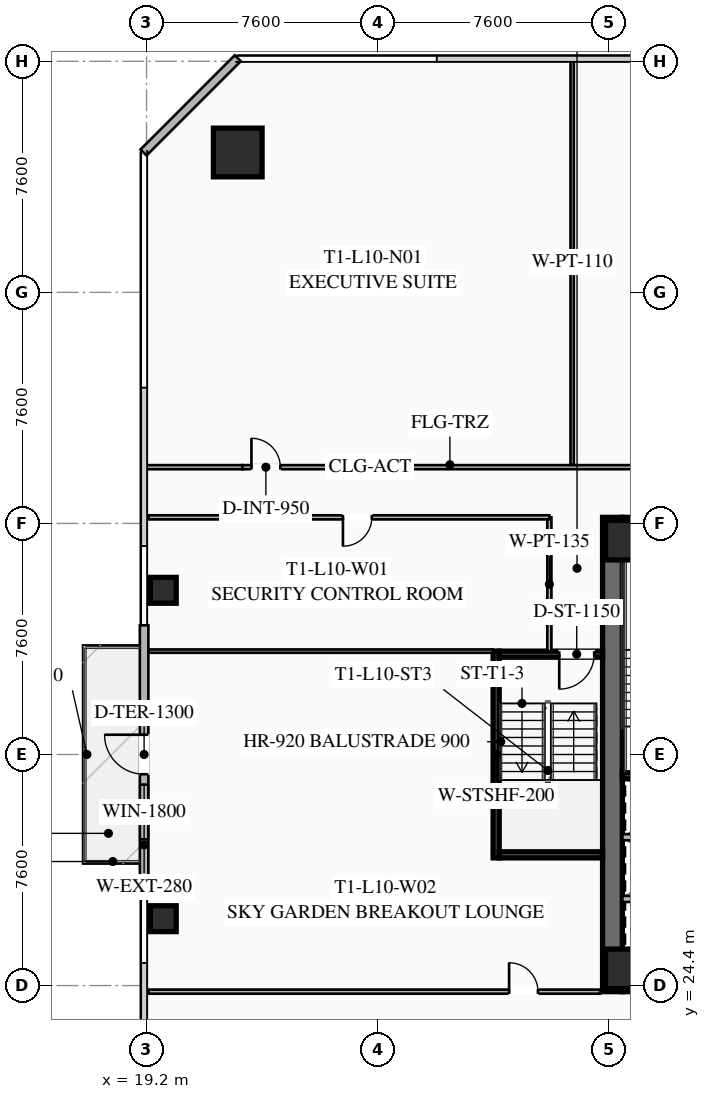
"""IFC4 building model, lengths in metres.
Left out: names, types, materials, properties, quantities, classifications, styles, units other than length and angle.
Written with IfcOpenShell. Run it as: python <this file> out.ifc"""

import sys

from ifc_helpers import new_model, si_unit, direction, frame, frame_2d, origin, origin_2d, place, context, subcontext, project, spatial, rectangle, hollow_rectangle, extrude, element, fill, save


model = new_model("IFC4")
c1 = context("Model", 3, precision=1e-05, world=origin(), true_north=direction((0.0, 1.0)))
c2 = subcontext(c1, "Body", "Model", "MODEL_VIEW")
j1 = project(units=[si_unit("LENGTHUNIT", "METRE"), si_unit("PLANEANGLEUNIT", "RADIAN")], contexts=[c1])
p1 = place(None, origin())
s1 = spatial("IfcSite", under=j1, at=p1, CompositionType="ELEMENT")
p2 = place(p1, origin())
s2 = spatial("IfcBuilding", under=s1, at=p2, CompositionType="ELEMENT")
p3 = place(p2, frame((0.0, 0.0, 42.35)))
s3 = spatial("IfcBuildingStorey", under=s2, at=p3, CompositionType="ELEMENT", Elevation=42.35)
p4 = place(p3, frame((34.525, 24.2, 0.0), z_axis=(0.0, 0.0, 1.0), x_axis=(0.0, 1.0, 0.0)))
e1 = element("IfcWall", 1, at=p4, inside=s3, PredefinedType="SHEAR", context=c2, shape_type="SweptSolid", body=[
    extrude(rectangle(XDim=15.6, YDim=0.65, at=frame_2d((7.8, 0.0))), origin(), (0.0, 0.0, 1.0), 3.55),
])
p5 = place(p3, frame((49.15, 24.525, 0.0), z_axis=(0.0, 0.0, 1.0), x_axis=(-1.0, 0.0, 0.0)))
e2 = element("IfcWall", 2, at=p5, inside=s3, PredefinedType="SHEAR", context=c2, shape_type="SweptSolid", body=[
    extrude(rectangle(XDim=14.3, YDim=0.65, at=frame_2d((7.15, 0.0))), origin(), (0.0, 0.0, 1.0), 3.55),
])
p6 = place(p5, frame((8.85, 0.0, 0.0)))
e3 = element("IfcOpeningElement", 3, at=p6, cuts=e2, PredefinedType="OPENING", context=c2, shape_type="SweptSolid", body=[
    extrude(rectangle(XDim=1.25, YDim=2.25, at=frame_2d((0.625, 1.125))), frame((0.0, 0.335, 0.0), z_axis=(0.0, -1.0, 0.0), x_axis=(1.0, 0.0, 0.0)), (0.0, 0.0, 1.0), 0.67),
])
p7 = place(p5, frame((3.8, 0.0, 0.0)))
e4 = element("IfcOpeningElement", 4, at=p7, cuts=e2, PredefinedType="OPENING", context=c2, shape_type="SweptSolid", body=[
    extrude(rectangle(XDim=1.25, YDim=2.25, at=frame_2d((0.625, 1.125))), frame((0.0, 0.335, 0.0), z_axis=(0.0, -1.0, 0.0), x_axis=(1.0, 0.0, 0.0)), (0.0, 0.0, 1.0), 0.67),
])
p8 = place(p3, frame((34.85, 39.475, 0.0), z_axis=(0.0, 0.0, 1.0), x_axis=(1.0, 0.0, 0.0)))
e5 = element("IfcWall", 5, at=p8, inside=s3, PredefinedType="SHEAR", context=c2, shape_type="SweptSolid", body=[
    extrude(rectangle(XDim=14.3, YDim=0.65, at=frame_2d((7.15, 0.0))), origin(), (0.0, 0.0, 1.0), 3.55),
])
p9 = place(p8, frame((4.2, 0.0, 0.0)))
e6 = element("IfcOpeningElement", 6, at=p9, cuts=e5, PredefinedType="OPENING", context=c2, shape_type="SweptSolid", body=[
    extrude(rectangle(XDim=1.25, YDim=2.25, at=frame_2d((0.625, 1.125))), frame((0.0, 0.335, 0.0), z_axis=(0.0, -1.0, 0.0), x_axis=(1.0, 0.0, 0.0)), (0.0, 0.0, 1.0), 0.67),
])
p10 = place(p8, frame((9.25, 0.0, 0.0)))
e7 = element("IfcOpeningElement", 7, at=p10, cuts=e5, PredefinedType="OPENING", context=c2, shape_type="SweptSolid", body=[
    extrude(rectangle(XDim=1.25, YDim=2.25, at=frame_2d((0.625, 1.125))), frame((0.0, 0.335, 0.0), z_axis=(0.0, -1.0, 0.0), x_axis=(1.0, 0.0, 0.0)), (0.0, 0.0, 1.0), 0.67),
])
for number, where, z_axis, x_axis in (
    (8, (34.95, 24.95, 0.0), (0.0, 0.0, 1.0), (1.0, 0.0, 0.0)),
    (9, (34.95, 39.05, 0.0), (0.0, 0.0, 1.0), (1.0, 0.0, 0.0)),
):
    element("IfcColumn", number, at=place(p3, frame(where, z_axis=z_axis, x_axis=x_axis)), inside=s3, PredefinedType="COLUMN", context=c2, shape_type="SweptSolid", body=[
        extrude(hollow_rectangle(XDim=1.3, YDim=1.3, WallThickness=0.05, at=origin_2d()), origin(), (0.0, 0.0, 1.0), 3.35),
    ])
p11 = place(p3, frame((22.2, 51.8, 0.0), z_axis=(0.0, 0.0, 1.0), x_axis=(1.0, 0.0, 0.0)))
e10 = element("IfcColumn", 10, at=p11, inside=s3, PredefinedType="COLUMN", context=c2, shape_type="SweptSolid", body=[
    extrude(hollow_rectangle(XDim=1.6, YDim=1.6, WallThickness=0.06, at=origin_2d()), origin(), (0.0, 0.0, 1.0), 3.35),
])
for number, where, z_axis, x_axis in (
    (11, (19.75, 37.4, 0.0), (0.0, 0.0, 1.0), (1.0, 0.0, 0.0)),
    (12, (19.75, 26.6, 0.0), (0.0, 0.0, 1.0), (1.0, 0.0, 0.0)),
):
    element("IfcColumn", number, at=place(p3, frame(where, z_axis=z_axis, x_axis=x_axis)), inside=s3, PredefinedType="COLUMN", context=c2, shape_type="SweptSolid", body=[
        extrude(hollow_rectangle(XDim=0.85, YDim=0.85, WallThickness=0.035, at=origin_2d()), origin(), (0.0, 0.0, 1.0), 3.35),
    ])
p12 = place(p3, frame((19.12, 27.75, 0.0), z_axis=(0.0, 0.0, 1.0), x_axis=(0.0, 1.0, 0.0)))
e13 = element("IfcWall", 13, at=p12, inside=s3, PredefinedType="SOLIDWALL", context=c2, shape_type="SweptSolid", body=[
    extrude(rectangle(XDim=8.5, YDim=0.28, at=frame_2d((4.25, 0.0))), origin(), (0.0, 0.0, 1.0), 3.35),
])
p13 = place(p12, frame((3.6, 0.0, 0.0)))
e14 = element("IfcOpeningElement", 14, at=p13, cuts=e13, PredefinedType="OPENING", context=c2, shape_type="SweptSolid", body=[
    extrude(rectangle(XDim=1.3, YDim=2.15, at=frame_2d((0.65, 1.075))), frame((0.0, 0.15, 0.0), z_axis=(0.0, -1.0, 0.0), x_axis=(1.0, 0.0, 0.0)), (0.0, 0.0, 1.0), 0.3),
])
p14 = place(p12, frame((1.46, 0.0, 0.85)))
e15 = element("IfcOpeningElement", 15, at=p14, cuts=e13, PredefinedType="OPENING", context=c2, shape_type="SweptSolid", body=[
    extrude(rectangle(XDim=1.8, YDim=1.92, at=frame_2d((0.9, 0.96))), frame((0.0, 0.15, 0.0), z_axis=(0.0, -1.0, 0.0), x_axis=(1.0, 0.0, 0.0)), (0.0, 0.0, 1.0), 0.3),
])
p15 = place(p3, frame((19.1, 51.8, 0.0), z_axis=(0.0, 0.0, 1.0), x_axis=(0.707106781187, 0.707106781187, 0.0)))
e16 = element("IfcWall", 16, at=p15, inside=s3, PredefinedType="SOLIDWALL", context=c2, shape_type="SweptSolid", body=[
    extrude(rectangle(XDim=4.384, YDim=0.28, at=frame_2d((2.192, 0.0))), origin(), (0.0, 0.0, 1.0), 3.35),
])
for number, where, z_axis, x_axis in (
    (17, (34.85, 31.3, 0.0), (0.0, 0.0, 1.0), (1.0, 0.0, 0.0)),
    (18, (34.85, 38.7, 0.0), (0.0, 0.0, 1.0), (1.0, 0.0, 0.0)),
):
    element("IfcWall", number, at=place(p3, frame(where, z_axis=z_axis, x_axis=x_axis)), inside=s3, PredefinedType="SHEAR", context=c2, shape_type="SweptSolid", body=[
        extrude(rectangle(XDim=3.45, YDim=0.2, at=frame_2d((1.725, 0.0))), origin(), (0.0, 0.0, 1.0), 3.35),
    ])
for number, where, z_axis, x_axis in (
    (19, (34.85, 27.25, 0.0), (0.0, 0.0, 1.0), (1.0, 0.0, 0.0)),
    (20, (34.85, 29.28, 0.0), (0.0, 0.0, 1.0), (1.0, 0.0, 0.0)),
):
    element("IfcWall", number, at=place(p3, frame(where, z_axis=z_axis, x_axis=x_axis)), inside=s3, PredefinedType="SOLIDWALL", context=c2, shape_type="SweptSolid", body=[
        extrude(rectangle(XDim=3.1, YDim=0.2, at=frame_2d((1.55, 0.0))), origin(), (0.0, 0.0, 1.0), 3.35),
    ])
p16 = place(p3, frame((30.7, 28.6, 0.0), z_axis=(0.0, 0.0, 1.0), x_axis=(0.0, 1.0, 0.0)))
e21 = element("IfcWall", 21, at=p16, inside=s3, PredefinedType="SHEAR", context=c2, shape_type="SweptSolid", body=[
    extrude(rectangle(XDim=6.8, YDim=0.2, at=frame_2d((3.4, 0.0))), origin(), (0.0, 0.0, 1.0), 3.35),
])
p17 = place(p3, frame((34.2, 35.3, 0.0), z_axis=(0.0, 0.0, 1.0), x_axis=(-1.0, 0.0, 0.0)))
e22 = element("IfcWall", 22, at=p17, inside=s3, PredefinedType="SHEAR", context=c2, shape_type="SweptSolid", body=[
    extrude(rectangle(XDim=3.4, YDim=0.2, at=frame_2d((1.7, 0.0))), origin(), (0.0, 0.0, 1.0), 3.35),
])
p18 = place(p17, frame((0.275, 0.0, 0.0)))
e23 = element("IfcOpeningElement", 23, at=p18, cuts=e22, PredefinedType="OPENING", context=c2, shape_type="SweptSolid", body=[
    extrude(rectangle(XDim=1.15, YDim=2.2, at=frame_2d((0.575, 1.1))), frame((0.0, 0.11, 0.0), z_axis=(0.0, -1.0, 0.0), x_axis=(1.0, 0.0, 0.0)), (0.0, 0.0, 1.0), 0.22),
])
p19 = place(p3, frame((30.8, 28.7, 0.0), z_axis=(0.0, 0.0, 1.0), x_axis=(1.0, 0.0, 0.0)))
e24 = element("IfcWall", 24, at=p19, inside=s3, PredefinedType="SHEAR", context=c2, shape_type="SweptSolid", body=[
    extrude(rectangle(XDim=3.4, YDim=0.2, at=frame_2d((1.7, 0.0))), origin(), (0.0, 0.0, 1.0), 3.35),
])
p20 = place(p3, frame((32.45, 35.4, 0.0), z_axis=(0.0, 0.0, 1.0), x_axis=(0.0, 1.0, 0.0)))
e25 = element("IfcWall", 25, at=p20, inside=s3, PredefinedType="PARTITIONING", context=c2, shape_type="SweptSolid", body=[
    extrude(rectangle(XDim=4.4, YDim=0.135, at=frame_2d((2.2, 0.0))), origin(), (0.0, 0.0, 1.0), 2.703),
])
p21 = place(p3, frame((22.35, 41.45, 0.0), z_axis=(0.0, 0.0, 1.0), x_axis=(1.0, 0.0, 0.0)))
e26 = element("IfcWall", 26, at=p21, inside=s3, PredefinedType="PARTITIONING", context=c2, shape_type="SweptSolid", body=[
    extrude(rectangle(XDim=30.9, YDim=0.135, at=frame_2d((15.45, 0.0))), origin(), (0.0, 0.0, 1.0), 2.703),
])
p22 = place(p21, frame((0.3, 0.0, 0.0)))
e27 = element("IfcOpeningElement", 27, at=p22, cuts=e26, PredefinedType="OPENING", context=c2, shape_type="SweptSolid", body=[
    extrude(rectangle(XDim=0.95, YDim=2.05, at=frame_2d((0.475, 1.025))), frame((0.0, 0.077, 0.0), z_axis=(0.0, -1.0, 0.0), x_axis=(1.0, 0.0, 0.0)), (0.0, 0.0, 1.0), 0.155),
])
p23 = place(p21, frame((19.463, 0.0, 0.0)))
e28 = element("IfcOpeningElement", 28, at=p23, cuts=e26, PredefinedType="OPENING", context=c2, shape_type="SweptSolid", body=[
    extrude(rectangle(XDim=0.95, YDim=2.05, at=frame_2d((0.475, 1.025))), frame((0.0, 0.077, 0.0), z_axis=(0.0, -1.0, 0.0), x_axis=(1.0, 0.0, 0.0)), (0.0, 0.0, 1.0), 0.155),
])
p24 = place(p21, frame((29.65, 0.0, 0.0)))
e29 = element("IfcOpeningElement", 29, at=p24, cuts=e26, PredefinedType="OPENING", context=c2, shape_type="SweptSolid", body=[
    extrude(rectangle(XDim=0.95, YDim=2.05, at=frame_2d((0.475, 1.025))), frame((0.0, 0.077, 0.0), z_axis=(0.0, -1.0, 0.0), x_axis=(1.0, 0.0, 0.0)), (0.0, 0.0, 1.0), 0.155),
])
p25 = place(p3, frame((19.12, 41.45, 0.0), z_axis=(0.0, 0.0, 1.0), x_axis=(1.0, 0.0, 0.0)))
e30 = element("IfcWall", 30, at=p25, inside=s3, PredefinedType="PARTITIONING", context=c2, shape_type="SweptSolid", body=[
    extrude(rectangle(XDim=3.23, YDim=0.135, at=frame_2d((1.615, 0.0))), origin(), (0.0, 0.0, 1.0), 2.703),
])
p26 = place(p3, frame((33.2, 41.53, 0.0), z_axis=(0.0, 0.0, 1.0), x_axis=(0.0, 1.0, 0.0)))
e31 = element("IfcWall", 31, at=p26, inside=s3, PredefinedType="PARTITIONING", context=c2, shape_type="SweptSolid", body=[
    extrude(rectangle(XDim=13.35, YDim=0.11, at=frame_2d((6.675, 0.0))), origin(), (0.0, 0.0, 1.0), 2.703),
])
p27 = place(p3, frame((32.45, 39.8, 0.0), z_axis=(0.0, 0.0, 1.0), x_axis=(-1.0, 0.0, 0.0)))
e32 = element("IfcWall", 32, at=p27, inside=s3, PredefinedType="PARTITIONING", context=c2, shape_type="SweptSolid", body=[
    extrude(rectangle(XDim=13.18, YDim=0.135, at=frame_2d((6.59, 0.0))), origin(), (0.0, 0.0, 1.0), 2.703),
])
p28 = place(p27, frame((5.84, 0.0, 0.0)))
e33 = element("IfcOpeningElement", 33, at=p28, cuts=e32, PredefinedType="OPENING", context=c2, shape_type="SweptSolid", body=[
    extrude(rectangle(XDim=0.95, YDim=2.05, at=frame_2d((0.475, 1.025))), frame((0.0, 0.077, 0.0), z_axis=(0.0, -1.0, 0.0), x_axis=(1.0, 0.0, 0.0)), (0.0, 0.0, 1.0), 0.155),
])
p29 = place(p3, frame((19.27, 24.2, 0.0), z_axis=(0.0, 0.0, 1.0), x_axis=(1.0, 0.0, 0.0)))
e34 = element("IfcWall", 34, at=p29, inside=s3, PredefinedType="PARTITIONING", context=c2, shape_type="SweptSolid", body=[
    extrude(rectangle(XDim=14.85, YDim=0.135, at=frame_2d((7.425, 0.0))), origin(), (0.0, 0.0, 1.0), 2.703),
])
p30 = place(p29, frame((11.855, 0.0, 0.0)))
e35 = element("IfcOpeningElement", 35, at=p30, cuts=e34, PredefinedType="OPENING", context=c2, shape_type="SweptSolid", body=[
    extrude(rectangle(XDim=0.95, YDim=2.05, at=frame_2d((0.475, 1.025))), frame((0.0, 0.077, 0.0), z_axis=(0.0, -1.0, 0.0), x_axis=(1.0, 0.0, 0.0)), (0.0, 0.0, 1.0), 0.155),
])
p31 = place(p3, frame((30.6, 35.4, 0.0), z_axis=(0.0, 0.0, 1.0), x_axis=(-1.0, 0.0, 0.0)))
e36 = element("IfcWall", 36, at=p31, inside=s3, PredefinedType="PARTITIONING", context=c2, shape_type="SweptSolid", body=[
    extrude(rectangle(XDim=11.33, YDim=0.11, at=frame_2d((5.665, 0.0))), origin(), (0.0, 0.0, 1.0), 2.703),
])
p32 = place(p13, origin())
e37 = element("IfcDoor", 37, at=p32, inside=s3, OperationType="SINGLE_SWING_RIGHT", PredefinedType="DOOR", context=c2, shape_type="SweptSolid", body=[
    extrude(rectangle(XDim=1.3, YDim=2.15, at=frame_2d((0.65, 1.075))), frame((0.0, 0.025, 0.0), z_axis=(0.0, -1.0, 0.0), x_axis=(1.0, 0.0, 0.0)), (0.0, 0.0, 1.0), 0.05),
])
fill(e14, e37)
p33 = place(p14, origin())
e38 = element("IfcWindow", 38, at=p33, inside=s3, PartitioningType="SINGLE_PANEL", PredefinedType="WINDOW", context=c2, shape_type="SweptSolid", body=[
    extrude(rectangle(XDim=1.8, YDim=1.92, at=frame_2d((0.9, 0.96))), frame((0.0, 0.03, 0.0), z_axis=(0.0, -1.0, 0.0), x_axis=(1.0, 0.0, 0.0)), (0.0, 0.0, 1.0), 0.06),
])
fill(e15, e38)
p34 = place(p18, origin())
e39 = element("IfcDoor", 39, at=p34, inside=s3, OperationType="SINGLE_SWING_RIGHT", PredefinedType="DOOR", context=c2, shape_type="SweptSolid", body=[
    extrude(rectangle(XDim=1.15, YDim=2.2, at=frame_2d((0.575, 1.1))), frame((0.0, 0.025, 0.0), z_axis=(0.0, -1.0, 0.0), x_axis=(1.0, 0.0, 0.0)), (0.0, 0.0, 1.0), 0.05),
])
fill(e23, e39)
p35 = place(p22, origin())
e40 = element("IfcDoor", 40, at=p35, inside=s3, OperationType="SINGLE_SWING_LEFT", PredefinedType="DOOR", context=c2, shape_type="SweptSolid", body=[
    extrude(rectangle(XDim=0.95, YDim=2.05, at=frame_2d((0.475, 1.025))), frame((0.0, 0.025, 0.0), z_axis=(0.0, -1.0, 0.0), x_axis=(1.0, 0.0, 0.0)), (0.0, 0.0, 1.0), 0.05),
])
fill(e27, e40)
p36 = place(p28, origin())
e41 = element("IfcDoor", 41, at=p36, inside=s3, OperationType="SINGLE_SWING_RIGHT", PredefinedType="DOOR", context=c2, shape_type="SweptSolid", body=[
    extrude(rectangle(XDim=0.95, YDim=2.05, at=frame_2d((0.475, 1.025))), frame((0.0, 0.025, 0.0), z_axis=(0.0, -1.0, 0.0), x_axis=(1.0, 0.0, 0.0)), (0.0, 0.0, 1.0), 0.05),
])
fill(e33, e41)
p37 = place(p30, origin())
e42 = element("IfcDoor", 42, at=p37, inside=s3, OperationType="SINGLE_SWING_LEFT", PredefinedType="DOOR", context=c2, shape_type="SweptSolid", body=[
    extrude(rectangle(XDim=0.95, YDim=2.05, at=frame_2d((0.475, 1.025))), frame((0.0, 0.025, 0.0), z_axis=(0.0, -1.0, 0.0), x_axis=(1.0, 0.0, 0.0)), (0.0, 0.0, 1.0), 0.05),
])
fill(e35, e42)
save(model, sys.argv[1])
